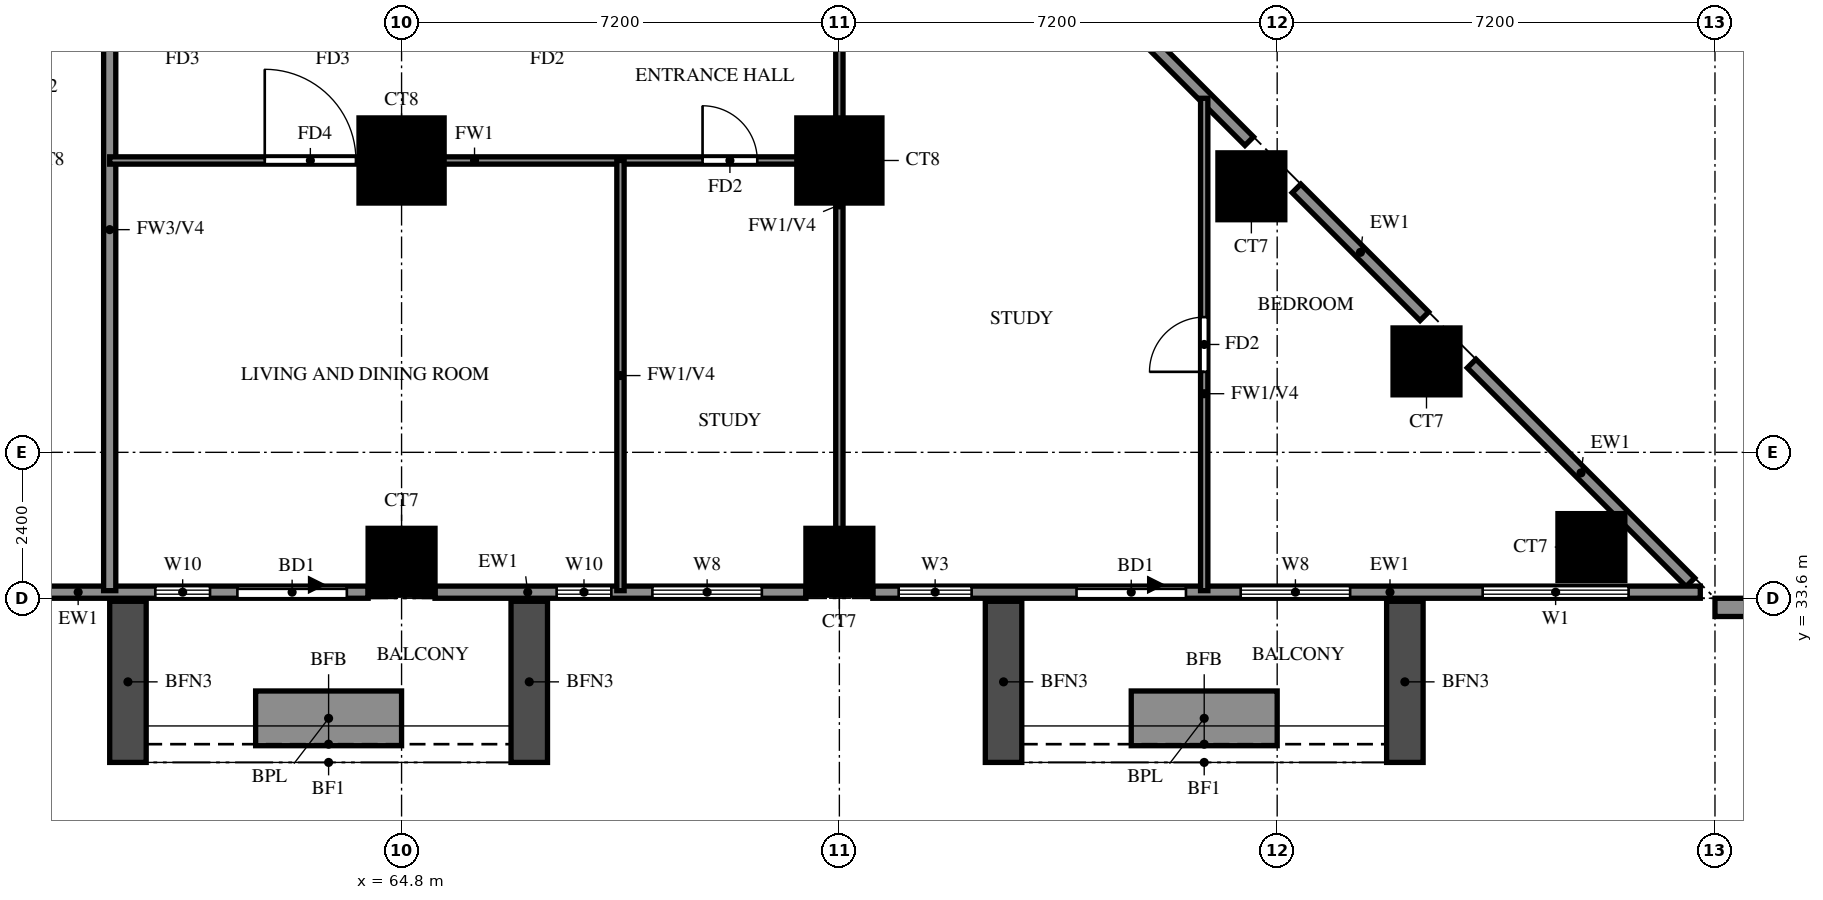
"""IFC4 building model, lengths in metres.
Left out: names, types, materials, properties, quantities, classifications, styles, units other than length and angle.
Written with IfcOpenShell. Run it as: python <this file> out.ifc"""

import sys

from ifc_helpers import new_model, si_unit, direction, frame, frame_2d, origin, origin_2d, place, context, subcontext, project, spatial, rectangle, extrude, source, transform, mapped, element, fill, save


model = new_model("IFC4")
c1 = context("Model", 3, precision=1e-05, world=origin(), true_north=direction((0.0, 1.0)))
c2 = subcontext(c1, "Body", "Model", "MODEL_VIEW")
j1 = project(units=[si_unit("LENGTHUNIT", "METRE"), si_unit("PLANEANGLEUNIT", "RADIAN")], contexts=[c1])
p1 = place(None, origin())
s1 = spatial("IfcSite", under=j1, at=p1, CompositionType="ELEMENT")
p2 = place(p1, origin())
s2 = spatial("IfcBuilding", under=s1, at=p2, CompositionType="ELEMENT")
p3 = place(p2, frame((0.0, 0.0, 58.5)))
s3 = spatial("IfcBuildingStorey", under=s2, at=p3, CompositionType="ELEMENT", Elevation=58.5)
m1 = source(origin(), c2, "Body", "SweptSolid", [
    extrude(rectangle(XDim=1.1, YDim=1.1, at=origin_2d()), origin(), (0.0, 0.0, 1.0), 3.18),
])
for number, where, z_axis, x_axis in (
    (1, (64.8, 34.2, 0.0), (0.0, 0.0, 1.0), (1.0, 0.0, 0.0)),
    (2, (72.0, 34.2, 0.0), (0.0, 0.0, 1.0), (1.0, 0.0, 0.0)),
    (3, (84.367, 34.442, 0.0), (0.0, 0.0, 1.0), (1.0, 0.0, 0.0)),
    (4, (81.656, 37.496, 0.0), (0.0, 0.0, 1.0), (1.0, 0.0, 0.0)),
    (5, (78.776, 40.376, 0.0), (0.0, 0.0, 1.0), (1.0, 0.0, 0.0)),
):
    element("IfcColumn", number, at=place(p3, frame(where, z_axis=z_axis, x_axis=x_axis)), inside=s3, PredefinedType="COLUMN", context=c2, shape_type="MappedRepresentation", body=[
        mapped(m1, transform((0.0, 0.0, 0.0))),
    ])
m2 = source(origin(), c2, "Body", "SweptSolid", [
    extrude(rectangle(XDim=1.4, YDim=1.4, at=origin_2d()), origin(), (0.0, 0.0, 1.0), 3.18),
])
for number, where, z_axis, x_axis in (
    (6, (64.8, 40.8, 0.0), (0.0, 0.0, 1.0), (1.0, 0.0, 0.0)),
    (7, (72.0, 40.8, 0.0), (0.0, 0.0, 1.0), (1.0, 0.0, 0.0)),
):
    element("IfcColumn", number, at=place(p3, frame(where, z_axis=z_axis, x_axis=x_axis)), inside=s3, PredefinedType="COLUMN", context=c2, shape_type="MappedRepresentation", body=[
        mapped(m2, transform((0.0, 0.0, 0.0))),
    ])
p4 = place(p3, frame((85.996, 33.863, 0.0), z_axis=(0.0, 0.0, 1.0), x_axis=(-0.7070827891, 0.707130772459, 0.0)))
e8 = element("IfcWall", 8, at=p4, inside=s3, PredefinedType="SOLIDWALL", context=c2, shape_type="SweptSolid", body=[
    extrude(rectangle(XDim=5.088, YDim=0.2, at=frame_2d((2.544, 0.0))), origin(), (0.0, 0.0, 1.0), 3.18),
])
p5 = place(p3, frame((81.62, 38.238, 0.0), z_axis=(0.0, 0.0, 1.0), x_axis=(-0.707106781187, 0.707106781187, 0.0)))
e9 = element("IfcWall", 9, at=p5, inside=s3, PredefinedType="SOLIDWALL", context=c2, shape_type="SweptSolid", body=[
    extrude(rectangle(XDim=2.973, YDim=0.2, at=frame_2d((1.486, 0.0))), origin(), (0.0, 0.0, 1.0), 3.18),
])
p6 = place(p3, frame((78.74, 41.118, 0.0), z_axis=(0.0, 0.0, 1.0), x_axis=(-0.707106781187, 0.707106781187, 0.0)))
e10 = element("IfcWall", 10, at=p6, inside=s3, PredefinedType="SOLIDWALL", context=c2, shape_type="SweptSolid", body=[
    extrude(rectangle(XDim=9.874, YDim=0.2, at=frame_2d((4.937, 0.0))), origin(), (0.0, 0.0, 1.0), 3.18),
])
p7 = place(p6, frame((2.264, 0.0, 0.6)))
e11 = element("IfcOpeningElement", 11, at=p7, cuts=e10, PredefinedType="OPENING", context=c2, shape_type="SweptSolid", body=[
    extrude(rectangle(XDim=2.4, YDim=2.4, at=frame_2d((1.2, 1.2))), frame((0.0, 0.11, 0.0), z_axis=(0.0, -1.0, 0.0), x_axis=(1.0, 0.0, 0.0)), (0.0, 0.0, 1.0), 0.22),
])
p8 = place(p6, frame((5.836, 0.0, 0.6)))
e12 = element("IfcOpeningElement", 12, at=p8, cuts=e10, PredefinedType="OPENING", context=c2, shape_type="SweptSolid", body=[
    extrude(rectangle(XDim=2.4, YDim=2.4, at=frame_2d((1.2, 1.2))), frame((0.0, 0.11, 0.0), z_axis=(0.0, -1.0, 0.0), x_axis=(1.0, 0.0, 0.0)), (0.0, 0.0, 1.0), 0.22),
])
p9 = place(p3, frame((58.8, 33.7, 0.0), z_axis=(0.0, 0.0, 1.0), x_axis=(1.0, 0.0, 0.0)))
e13 = element("IfcWall", 13, at=p9, inside=s3, PredefinedType="SOLIDWALL", context=c2, shape_type="SweptSolid", body=[
    extrude(rectangle(XDim=5.45, YDim=0.2, at=frame_2d((2.725, 0.0))), origin(), (0.0, 0.0, 1.0), 3.18),
])
p10 = place(p9, frame((3.3, 0.0, 0.0)))
e14 = element("IfcOpeningElement", 14, at=p10, cuts=e13, PredefinedType="OPENING", context=c2, shape_type="SweptSolid", body=[
    extrude(rectangle(XDim=1.8, YDim=2.4, at=frame_2d((0.9, 1.2))), frame((0.0, 0.11, 0.0), z_axis=(0.0, -1.0, 0.0), x_axis=(1.0, 0.0, 0.0)), (0.0, 0.0, 1.0), 0.22),
])
p11 = place(p9, frame((1.95, 0.0, 0.6)))
e15 = element("IfcOpeningElement", 15, at=p11, cuts=e13, PredefinedType="OPENING", context=c2, shape_type="SweptSolid", body=[
    extrude(rectangle(XDim=0.9, YDim=2.4, at=frame_2d((0.45, 1.2))), frame((0.0, 0.11, 0.0), z_axis=(0.0, -1.0, 0.0), x_axis=(1.0, 0.0, 0.0)), (0.0, 0.0, 1.0), 0.22),
])
p12 = place(p3, frame((65.35, 33.7, 0.0), z_axis=(0.0, 0.0, 1.0), x_axis=(1.0, 0.0, 0.0)))
e16 = element("IfcWall", 16, at=p12, inside=s3, PredefinedType="SOLIDWALL", context=c2, shape_type="SweptSolid", body=[
    extrude(rectangle(XDim=6.1, YDim=0.2, at=frame_2d((3.05, 0.0))), origin(), (0.0, 0.0, 1.0), 3.18),
])
p13 = place(p12, frame((3.575, 0.0, 0.6)))
e17 = element("IfcOpeningElement", 17, at=p13, cuts=e16, PredefinedType="OPENING", context=c2, shape_type="SweptSolid", body=[
    extrude(rectangle(XDim=1.8, YDim=2.4, at=frame_2d((0.9, 1.2))), frame((0.0, 0.11, 0.0), z_axis=(0.0, -1.0, 0.0), x_axis=(1.0, 0.0, 0.0)), (0.0, 0.0, 1.0), 0.22),
])
p14 = place(p12, frame((2.0, 0.0, 0.6)))
e18 = element("IfcOpeningElement", 18, at=p14, cuts=e16, PredefinedType="OPENING", context=c2, shape_type="SweptSolid", body=[
    extrude(rectangle(XDim=0.9, YDim=2.4, at=frame_2d((0.45, 1.2))), frame((0.0, 0.11, 0.0), z_axis=(0.0, -1.0, 0.0), x_axis=(1.0, 0.0, 0.0)), (0.0, 0.0, 1.0), 0.22),
])
p15 = place(p3, frame((72.55, 33.7, 0.0), z_axis=(0.0, 0.0, 1.0), x_axis=(1.0, 0.0, 0.0)))
e19 = element("IfcWall", 19, at=p15, inside=s3, PredefinedType="SOLIDWALL", context=c2, shape_type="SweptSolid", body=[
    extrude(rectangle(XDim=13.609, YDim=0.2, at=frame_2d((6.804, 0.0))), origin(), (0.0, 0.0, 1.0), 3.18),
])
p16 = place(p15, frame((3.35, 0.0, 0.0)))
e20 = element("IfcOpeningElement", 20, at=p16, cuts=e19, PredefinedType="OPENING", context=c2, shape_type="SweptSolid", body=[
    extrude(rectangle(XDim=1.8, YDim=2.4, at=frame_2d((0.9, 1.2))), frame((0.0, 0.11, 0.0), z_axis=(0.0, -1.0, 0.0), x_axis=(1.0, 0.0, 0.0)), (0.0, 0.0, 1.0), 0.22),
])
p17 = place(p15, frame((0.425, 0.0, 0.6)))
e21 = element("IfcOpeningElement", 21, at=p17, cuts=e19, PredefinedType="OPENING", context=c2, shape_type="SweptSolid", body=[
    extrude(rectangle(XDim=1.2, YDim=2.4, at=frame_2d((0.6, 1.2))), frame((0.0, 0.11, 0.0), z_axis=(0.0, -1.0, 0.0), x_axis=(1.0, 0.0, 0.0)), (0.0, 0.0, 1.0), 0.22),
])
p18 = place(p15, frame((6.05, 0.0, 0.6)))
e22 = element("IfcOpeningElement", 22, at=p18, cuts=e19, PredefinedType="OPENING", context=c2, shape_type="SweptSolid", body=[
    extrude(rectangle(XDim=1.8, YDim=2.4, at=frame_2d((0.9, 1.2))), frame((0.0, 0.11, 0.0), z_axis=(0.0, -1.0, 0.0), x_axis=(1.0, 0.0, 0.0)), (0.0, 0.0, 1.0), 0.22),
])
p19 = place(p15, frame((10.029, 0.0, 0.6)))
e23 = element("IfcOpeningElement", 23, at=p19, cuts=e19, PredefinedType="OPENING", context=c2, shape_type="SweptSolid", body=[
    extrude(rectangle(XDim=2.4, YDim=2.4, at=frame_2d((1.2, 1.2))), frame((0.0, 0.11, 0.0), z_axis=(0.0, -1.0, 0.0), x_axis=(1.0, 0.0, 0.0)), (0.0, 0.0, 1.0), 0.22),
])
p20 = place(p3, frame((86.4, 33.45, -0.32), z_axis=(0.0, 0.0, 1.0), x_axis=(1.0, 0.0, 0.0)))
e24 = element("IfcWall", 24, at=p20, inside=s3, PredefinedType="SOLIDWALL", context=c2, shape_type="SweptSolid", body=[
    extrude(rectangle(XDim=2.4, YDim=0.3, at=frame_2d((1.2, 0.0))), origin(), (0.0, 0.0, 1.0), 3.5),
])
for number, where, z_axis, x_axis in (
    (25, (60.3, 33.55, 0.0), (0.0, 0.0, 1.0), (0.0, -1.0, 0.0)),
    (26, (66.9, 33.55, 0.0), (0.0, 0.0, 1.0), (0.0, -1.0, 0.0)),
):
    element("IfcWall", number, at=place(p3, frame(where, z_axis=z_axis, x_axis=x_axis)), inside=s3, PredefinedType="SOLIDWALL", context=c2, shape_type="SweptSolid", body=[
        extrude(rectangle(XDim=2.65, YDim=0.6, at=frame_2d((1.325, 0.0))), origin(), (0.0, 0.0, 1.0), 2.85),
    ])
p21 = place(p3, frame((62.4, 31.625, 0.0), z_axis=(0.0, 0.0, 1.0), x_axis=(1.0, 0.0, 0.0)))
e27 = element("IfcWall", 27, at=p21, inside=s3, PredefinedType="SOLIDWALL", context=c2, shape_type="SweptSolid", body=[
    extrude(rectangle(XDim=2.4, YDim=0.9, at=frame_2d((1.2, 0.0))), origin(), (0.0, 0.0, 1.0), 0.9),
])
for number, where, z_axis, x_axis in (
    (28, (74.7, 33.55, 0.0), (0.0, 0.0, 1.0), (0.0, -1.0, 0.0)),
    (29, (81.3, 33.55, 0.0), (0.0, 0.0, 1.0), (0.0, -1.0, 0.0)),
):
    element("IfcWall", number, at=place(p3, frame(where, z_axis=z_axis, x_axis=x_axis)), inside=s3, PredefinedType="SOLIDWALL", context=c2, shape_type="SweptSolid", body=[
        extrude(rectangle(XDim=2.65, YDim=0.6, at=frame_2d((1.325, 0.0))), origin(), (0.0, 0.0, 1.0), 2.85),
    ])
p22 = place(p3, frame((76.8, 31.625, 0.0), z_axis=(0.0, 0.0, 1.0), x_axis=(1.0, 0.0, 0.0)))
e30 = element("IfcWall", 30, at=p22, inside=s3, PredefinedType="SOLIDWALL", context=c2, shape_type="SweptSolid", body=[
    extrude(rectangle(XDim=2.4, YDim=0.9, at=frame_2d((1.2, 0.0))), origin(), (0.0, 0.0, 1.0), 0.9),
])
p23 = place(p3, frame((60.0, 33.725, 0.0), z_axis=(0.0, 0.0, 1.0), x_axis=(0.0, 1.0, 0.0)))
e31 = element("IfcWall", 31, at=p23, inside=s3, PredefinedType="SOLIDWALL", context=c2, shape_type="SweptSolid", body=[
    extrude(rectangle(XDim=11.875, YDim=0.2, at=frame_2d((5.938, 0.0))), origin(), (0.0, 0.0, 1.0), 2.28),
])
p24 = place(p3, frame((60.0, 40.8, 0.0), z_axis=(0.0, 0.0, 1.0), x_axis=(1.0, 0.0, 0.0)))
e32 = element("IfcWall", 32, at=p24, inside=s3, PredefinedType="PARTITIONING", context=c2, shape_type="SweptSolid", body=[
    extrude(rectangle(XDim=12.0, YDim=0.12, at=frame_2d((6.0, 0.0))), origin(), (0.0, 0.0, 1.0), 3.18),
])
p25 = place(p24, frame((9.75, 0.0, 0.0)))
e33 = element("IfcOpeningElement", 33, at=p25, cuts=e32, PredefinedType="OPENING", context=c2, shape_type="SweptSolid", body=[
    extrude(rectangle(XDim=0.9, YDim=2.1, at=frame_2d((0.45, 1.05))), frame((0.0, 0.07, 0.0), z_axis=(0.0, -1.0, 0.0), x_axis=(1.0, 0.0, 0.0)), (0.0, 0.0, 1.0), 0.14),
])
p26 = place(p24, frame((2.55, 0.0, 0.0)))
e34 = element("IfcOpeningElement", 34, at=p26, cuts=e32, PredefinedType="OPENING", context=c2, shape_type="SweptSolid", body=[
    extrude(rectangle(XDim=1.5, YDim=2.1, at=frame_2d((0.75, 1.05))), frame((0.0, 0.07, 0.0), z_axis=(0.0, -1.0, 0.0), x_axis=(1.0, 0.0, 0.0)), (0.0, 0.0, 1.0), 0.14),
])
p27 = place(p3, frame((68.4, 33.725, 0.0), z_axis=(0.0, 0.0, 1.0), x_axis=(0.0, 1.0, 0.0)))
e35 = element("IfcWall", 35, at=p27, inside=s3, PredefinedType="PARTITIONING", context=c2, shape_type="SweptSolid", body=[
    extrude(rectangle(XDim=7.075, YDim=0.12, at=frame_2d((3.538, 0.0))), origin(), (0.0, 0.0, 1.0), 2.28),
])
p28 = place(p3, frame((72.0, 33.725, 0.0), z_axis=(0.0, 0.0, 1.0), x_axis=(0.0, 1.0, 0.0)))
e36 = element("IfcWall", 36, at=p28, inside=s3, PredefinedType="PARTITIONING", context=c2, shape_type="SweptSolid", body=[
    extrude(rectangle(XDim=14.098, YDim=0.12, at=frame_2d((7.049, 0.0))), origin(), (0.0, 0.0, 1.0), 2.28),
])
p29 = place(p28, frame((10.075, 0.0, 0.0)))
e37 = element("IfcOpeningElement", 37, at=p29, cuts=e36, PredefinedType="OPENING", context=c2, shape_type="SweptSolid", body=[
    extrude(rectangle(XDim=0.9, YDim=2.1, at=frame_2d((0.45, 1.05))), frame((0.0, 0.07, 0.0), z_axis=(0.0, -1.0, 0.0), x_axis=(1.0, 0.0, 0.0)), (0.0, 0.0, 1.0), 0.14),
])
p30 = place(p3, frame((78.0, 33.725, 0.0), z_axis=(0.0, 0.0, 1.0), x_axis=(0.0, 1.0, 0.0)))
e38 = element("IfcWall", 38, at=p30, inside=s3, PredefinedType="PARTITIONING", context=c2, shape_type="SweptSolid", body=[
    extrude(rectangle(XDim=8.098, YDim=0.12, at=frame_2d((4.049, 0.0))), origin(), (0.0, 0.0, 1.0), 2.28),
])
p31 = place(p30, frame((3.599, 0.0, 0.0)))
e39 = element("IfcOpeningElement", 39, at=p31, cuts=e38, PredefinedType="OPENING", context=c2, shape_type="SweptSolid", body=[
    extrude(rectangle(XDim=0.9, YDim=2.1, at=frame_2d((0.45, 1.05))), frame((0.0, 0.07, 0.0), z_axis=(0.0, -1.0, 0.0), x_axis=(1.0, 0.0, 0.0)), (0.0, 0.0, 1.0), 0.14),
])
p32 = place(p10, origin())
e40 = element("IfcDoor", 40, at=p32, inside=s3, OperationType="DOUBLE_DOOR_SLIDING", PredefinedType="DOOR", context=c2, shape_type="SweptSolid", body=[
    extrude(rectangle(XDim=1.8, YDim=2.4, at=frame_2d((0.9, 1.2))), frame((0.0, 0.025, 0.0), z_axis=(0.0, -1.0, 0.0), x_axis=(1.0, 0.0, 0.0)), (0.0, 0.0, 1.0), 0.05),
])
fill(e14, e40)
p33 = place(p11, origin())
e41 = element("IfcWindow", 41, at=p33, inside=s3, PartitioningType="SINGLE_PANEL", PredefinedType="WINDOW", context=c2, shape_type="SweptSolid", body=[
    extrude(rectangle(XDim=0.9, YDim=2.4, at=frame_2d((0.45, 1.2))), frame((0.0, 0.03, 0.0), z_axis=(0.0, -1.0, 0.0), x_axis=(1.0, 0.0, 0.0)), (0.0, 0.0, 1.0), 0.06),
])
fill(e15, e41)
p34 = place(p13, origin())
e42 = element("IfcWindow", 42, at=p34, inside=s3, PartitioningType="DOUBLE_PANEL_VERTICAL", PredefinedType="WINDOW", context=c2, shape_type="SweptSolid", body=[
    extrude(rectangle(XDim=1.8, YDim=2.4, at=frame_2d((0.9, 1.2))), frame((0.0, 0.03, 0.0), z_axis=(0.0, -1.0, 0.0), x_axis=(1.0, 0.0, 0.0)), (0.0, 0.0, 1.0), 0.06),
])
fill(e17, e42)
p35 = place(p14, origin())
e43 = element("IfcWindow", 43, at=p35, inside=s3, PartitioningType="SINGLE_PANEL", PredefinedType="WINDOW", context=c2, shape_type="SweptSolid", body=[
    extrude(rectangle(XDim=0.9, YDim=2.4, at=frame_2d((0.45, 1.2))), frame((0.0, 0.03, 0.0), z_axis=(0.0, -1.0, 0.0), x_axis=(1.0, 0.0, 0.0)), (0.0, 0.0, 1.0), 0.06),
])
fill(e18, e43)
p36 = place(p16, origin())
e44 = element("IfcDoor", 44, at=p36, inside=s3, OperationType="DOUBLE_DOOR_SLIDING", PredefinedType="DOOR", context=c2, shape_type="SweptSolid", body=[
    extrude(rectangle(XDim=1.8, YDim=2.4, at=frame_2d((0.9, 1.2))), frame((0.0, 0.025, 0.0), z_axis=(0.0, -1.0, 0.0), x_axis=(1.0, 0.0, 0.0)), (0.0, 0.0, 1.0), 0.05),
])
fill(e20, e44)
p37 = place(p17, origin())
e45 = element("IfcWindow", 45, at=p37, inside=s3, PartitioningType="SINGLE_PANEL", PredefinedType="WINDOW", context=c2, shape_type="SweptSolid", body=[
    extrude(rectangle(XDim=1.2, YDim=2.4, at=frame_2d((0.6, 1.2))), frame((0.0, 0.03, 0.0), z_axis=(0.0, -1.0, 0.0), x_axis=(1.0, 0.0, 0.0)), (0.0, 0.0, 1.0), 0.06),
])
fill(e21, e45)
p38 = place(p18, origin())
e46 = element("IfcWindow", 46, at=p38, inside=s3, PartitioningType="DOUBLE_PANEL_VERTICAL", PredefinedType="WINDOW", context=c2, shape_type="SweptSolid", body=[
    extrude(rectangle(XDim=1.8, YDim=2.4, at=frame_2d((0.9, 1.2))), frame((0.0, 0.03, 0.0), z_axis=(0.0, -1.0, 0.0), x_axis=(1.0, 0.0, 0.0)), (0.0, 0.0, 1.0), 0.06),
])
fill(e22, e46)
p39 = place(p19, origin())
e47 = element("IfcWindow", 47, at=p39, inside=s3, PartitioningType="DOUBLE_PANEL_VERTICAL", PredefinedType="WINDOW", context=c2, shape_type="SweptSolid", body=[
    extrude(rectangle(XDim=2.4, YDim=2.4, at=frame_2d((1.2, 1.2))), frame((0.0, 0.03, 0.0), z_axis=(0.0, -1.0, 0.0), x_axis=(1.0, 0.0, 0.0)), (0.0, 0.0, 1.0), 0.06),
])
fill(e23, e47)
p40 = place(p25, origin())
e48 = element("IfcDoor", 48, at=p40, inside=s3, OperationType="SINGLE_SWING_LEFT", PredefinedType="DOOR", context=c2, shape_type="SweptSolid", body=[
    extrude(rectangle(XDim=0.9, YDim=2.1, at=frame_2d((0.45, 1.05))), frame((0.0, 0.025, 0.0), z_axis=(0.0, -1.0, 0.0), x_axis=(1.0, 0.0, 0.0)), (0.0, 0.0, 1.0), 0.05),
])
fill(e33, e48)
p41 = place(p26, origin())
e49 = element("IfcDoor", 49, at=p41, inside=s3, OperationType="SINGLE_SWING_LEFT", PredefinedType="DOOR", context=c2, shape_type="SweptSolid", body=[
    extrude(rectangle(XDim=1.5, YDim=2.1, at=frame_2d((0.75, 1.05))), frame((0.0, 0.025, 0.0), z_axis=(0.0, -1.0, 0.0), x_axis=(1.0, 0.0, 0.0)), (0.0, 0.0, 1.0), 0.05),
])
fill(e34, e49)
p42 = place(p31, origin())
e50 = element("IfcDoor", 50, at=p42, inside=s3, OperationType="SINGLE_SWING_LEFT", PredefinedType="DOOR", context=c2, shape_type="SweptSolid", body=[
    extrude(rectangle(XDim=0.9, YDim=2.1, at=frame_2d((0.45, 1.05))), frame((0.0, 0.025, 0.0), z_axis=(0.0, -1.0, 0.0), x_axis=(1.0, 0.0, 0.0)), (0.0, 0.0, 1.0), 0.05),
])
fill(e39, e50)
save(model, sys.argv[1])
